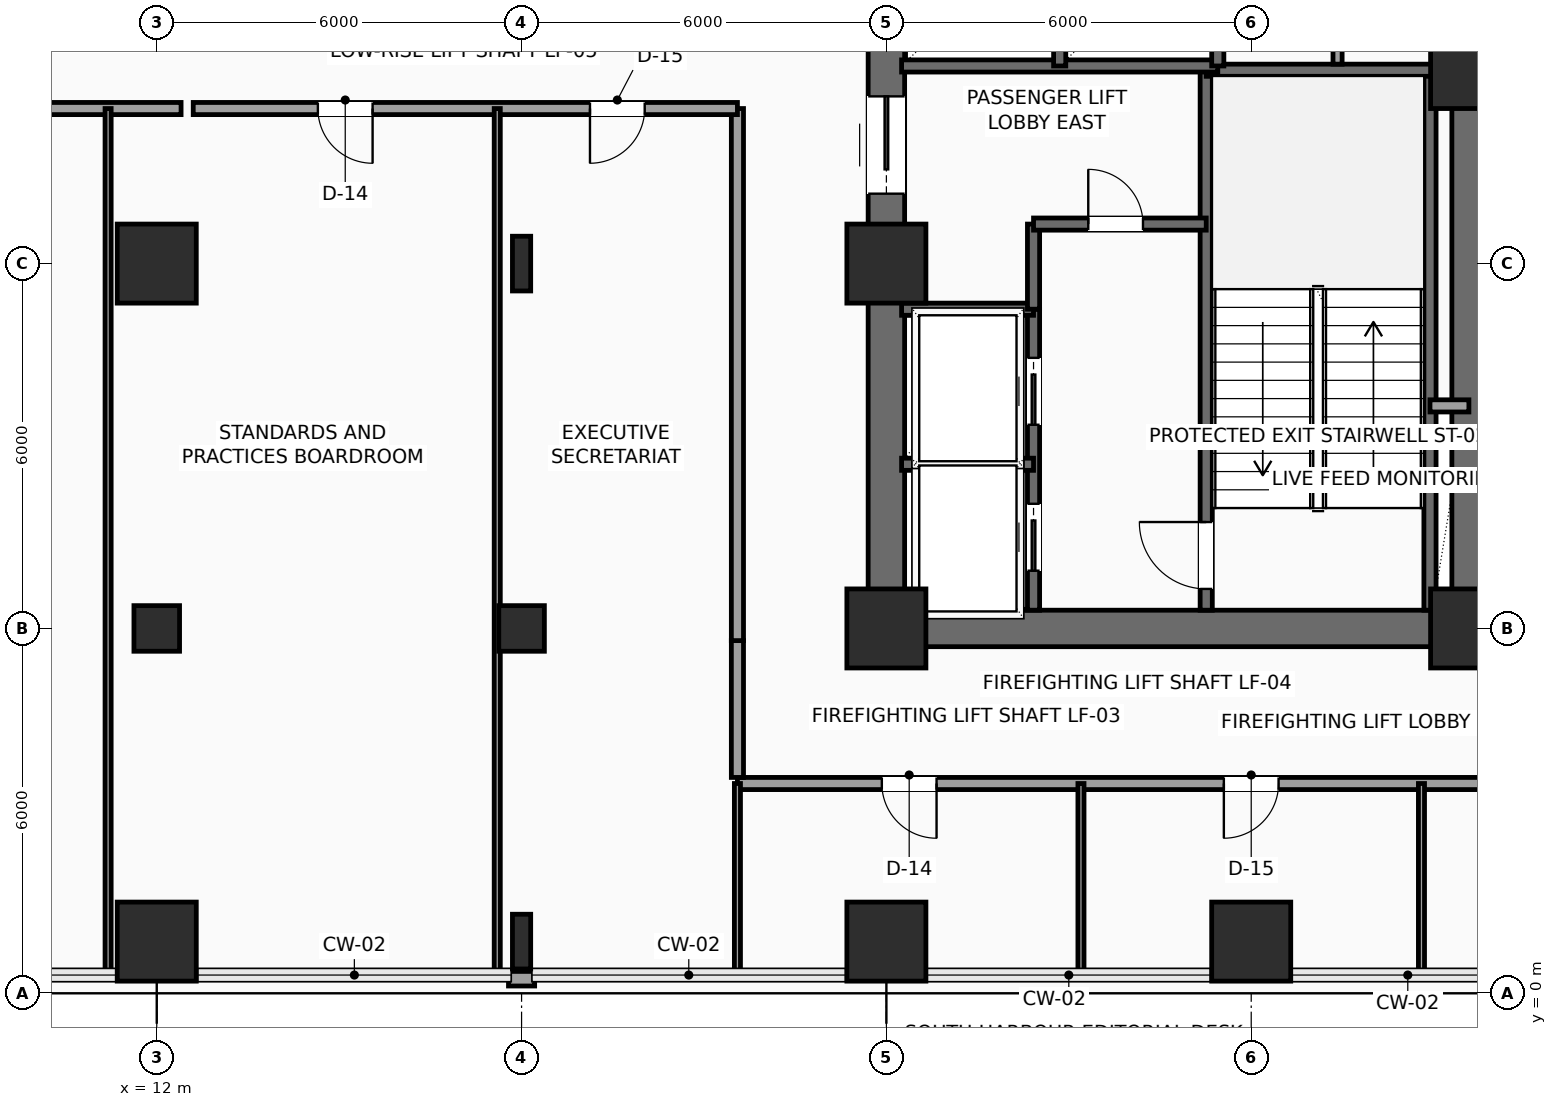
"""IFC4 building model, lengths in metres.
Left out: names, types, materials, properties, quantities, classifications, styles, units other than length and angle.
Written with IfcOpenShell. Run it as: python <this file> out.ifc"""

import sys

from ifc_helpers import new_model, si_unit, direction, frame, frame_2d, origin, origin_2d, place, context, subcontext, project, spatial, rectangle, hollow_rectangle, i_section, extrude, element, fill, save


model = new_model("IFC4")
c1 = context("Model", 3, precision=1e-05, world=origin(), true_north=direction((0.0, 1.0)))
c2 = subcontext(c1, "Body", "Model", "MODEL_VIEW")
j1 = project(units=[si_unit("LENGTHUNIT", "METRE"), si_unit("PLANEANGLEUNIT", "RADIAN")], contexts=[c1])
p1 = place(None, origin())
s1 = spatial("IfcSite", under=j1, at=p1, CompositionType="ELEMENT")
p2 = place(p1, origin())
s2 = spatial("IfcBuilding", under=s1, at=p2, CompositionType="ELEMENT")
p3 = place(p2, frame((0.0, 0.0, 90.9)))
s3 = spatial("IfcBuildingStorey", under=s2, at=p3, CompositionType="ELEMENT", Elevation=90.9)
for number, where, z_axis, x_axis in (
    (1, (24.0, 6.0, 0.0), (0.0, 0.0, 1.0), (1.0, 0.0, 0.0)),
    (2, (24.0, 12.0, 0.0), (0.0, 0.0, 1.0), (1.0, 0.0, 0.0)),
    (3, (33.6, 6.0, 0.0), (0.0, 0.0, 1.0), (1.0, 0.0, 0.0)),
    (4, (33.6, 15.2, 0.0), (0.0, 0.0, 1.0), (1.0, 0.0, 0.0)),
    (5, (12.0, 0.85, 0.0), (0.0, 0.0, 1.0), (1.0, 0.0, 0.0)),
):
    element("IfcColumn", number, at=place(p3, frame(where, z_axis=z_axis, x_axis=x_axis)), inside=s3, PredefinedType="COLUMN", context=c2, shape_type="SweptSolid", body=[
        extrude(rectangle(XDim=1.3, YDim=1.3, at=origin_2d()), origin(), (0.0, 0.0, 1.0), 3.9),
    ])
p4 = place(p3, frame((12.0, 6.0, 0.0), z_axis=(0.0, 0.0, 1.0), x_axis=(1.0, 0.0, 0.0)))
e6 = element("IfcColumn", 6, at=p4, inside=s3, PredefinedType="COLUMN", context=c2, shape_type="SweptSolid", body=[
    extrude(hollow_rectangle(XDim=0.75, YDim=0.75, WallThickness=0.035, InnerFilletRadius=0.035, OuterFilletRadius=0.05, at=origin_2d()), origin(), (0.0, 0.0, 1.0), 3.9),
])
p5 = place(p3, frame((12.0, 12.0, 0.0), z_axis=(0.0, 0.0, 1.0), x_axis=(1.0, 0.0, 0.0)))
e7 = element("IfcColumn", 7, at=p5, inside=s3, PredefinedType="COLUMN", context=c2, shape_type="SweptSolid", body=[
    extrude(rectangle(XDim=1.3, YDim=1.3, at=origin_2d()), origin(), (0.0, 0.0, 1.0), 3.9),
])
p6 = place(p3, frame((18.0, 0.85, 0.0), z_axis=(0.0, 0.0, 1.0), x_axis=(1.0, 0.0, 0.0)))
e8 = element("IfcColumn", 8, at=p6, inside=s3, PredefinedType="COLUMN", context=c2, shape_type="SweptSolid", body=[
    extrude(i_section(OverallWidth=0.3, OverallDepth=0.9, WebThickness=0.019, FlangeThickness=0.035, FilletRadius=0.03, at=origin_2d()), origin(), (0.0, 0.0, 1.0), 3.9),
])
p7 = place(p3, frame((18.0, 6.0, 0.0), z_axis=(0.0, 0.0, 1.0), x_axis=(1.0, 0.0, 0.0)))
e9 = element("IfcColumn", 9, at=p7, inside=s3, PredefinedType="COLUMN", context=c2, shape_type="SweptSolid", body=[
    extrude(hollow_rectangle(XDim=0.75, YDim=0.75, WallThickness=0.035, InnerFilletRadius=0.035, OuterFilletRadius=0.05, at=origin_2d()), origin(), (0.0, 0.0, 1.0), 3.9),
])
p8 = place(p3, frame((18.0, 12.0, 0.0), z_axis=(0.0, 0.0, 1.0), x_axis=(1.0, 0.0, 0.0)))
e10 = element("IfcColumn", 10, at=p8, inside=s3, PredefinedType="COLUMN", context=c2, shape_type="SweptSolid", body=[
    extrude(i_section(OverallWidth=0.3, OverallDepth=0.9, WebThickness=0.019, FlangeThickness=0.035, FilletRadius=0.03, at=origin_2d()), origin(), (0.0, 0.0, 1.0), 3.9),
])
for number, where, z_axis, x_axis in (
    (11, (24.0, 0.85, 0.0), (0.0, 0.0, 1.0), (1.0, 0.0, 0.0)),
    (12, (30.0, 0.85, 0.0), (0.0, 0.0, 1.0), (1.0, 0.0, 0.0)),
):
    element("IfcColumn", number, at=place(p3, frame(where, z_axis=z_axis, x_axis=x_axis)), inside=s3, PredefinedType="COLUMN", context=c2, shape_type="SweptSolid", body=[
        extrude(rectangle(XDim=1.3, YDim=1.3, at=origin_2d()), origin(), (0.0, 0.0, 1.0), 3.9),
    ])
p9 = place(p3, frame((18.215, 0.24, 0.0), z_axis=(0.0, 0.0, 1.0), x_axis=(-1.0, 0.0, 0.0)))
e13 = element("IfcWall", 13, at=p9, inside=s3, PredefinedType="SOLIDWALL", context=c2, shape_type="SweptSolid", body=[
    extrude(rectangle(XDim=0.43, YDim=0.24, at=frame_2d((0.215, 0.0))), origin(), (0.0, 0.0, 1.0), 3.575),
])
p10 = place(p3, frame((24.0, 6.0, 0.0), z_axis=(0.0, 0.0, 1.0), x_axis=(1.0, 0.0, 0.0)))
e14 = element("IfcWall", 14, at=p10, inside=s3, PredefinedType="SHEAR", context=c2, shape_type="SweptSolid", body=[
    extrude(rectangle(XDim=9.6, YDim=0.6, at=frame_2d((4.8, 0.0))), origin(), (0.0, 0.0, 1.0), 3.575),
])
p11 = place(p3, frame((24.0, 6.0, 0.0), z_axis=(0.0, 0.0, 1.0), x_axis=(0.0, 1.0, 0.0)))
e15 = element("IfcWall", 15, at=p11, inside=s3, PredefinedType="SHEAR", context=c2, shape_type="SweptSolid", body=[
    extrude(rectangle(XDim=12.0, YDim=0.6, at=frame_2d((6.0, 0.0))), origin(), (0.0, 0.0, 1.0), 3.575),
])
p12 = place(p11, frame((7.15, 0.0, 0.0)))
e16 = element("IfcOpeningElement", 16, at=p12, cuts=e15, PredefinedType="OPENING", context=c2, shape_type="SweptSolid", body=[
    extrude(rectangle(XDim=1.6, YDim=2.3, at=frame_2d((0.8, 1.15))), frame((0.0, 0.31, 0.0), z_axis=(0.0, -1.0, 0.0), x_axis=(1.0, 0.0, 0.0)), (0.0, 0.0, 1.0), 0.62),
])
p13 = place(p3, frame((33.6, 6.0, 0.0), z_axis=(0.0, 0.0, 1.0), x_axis=(0.0, 1.0, 0.0)))
e17 = element("IfcWall", 17, at=p13, inside=s3, PredefinedType="SHEAR", context=c2, shape_type="SweptSolid", body=[
    extrude(rectangle(XDim=12.0, YDim=0.6, at=frame_2d((6.0, 0.0))), origin(), (0.0, 0.0, 1.0), 3.575),
])
p14 = place(p13, frame((10.2, 0.0, 0.0)))
e18 = element("IfcOpeningElement", 18, at=p14, cuts=e17, PredefinedType="OPENING", context=c2, shape_type="SweptSolid", body=[
    extrude(rectangle(XDim=0.9, YDim=2.15, at=frame_2d((0.45, 1.075))), frame((0.0, 0.31, 0.0), z_axis=(0.0, -1.0, 0.0), x_axis=(1.0, 0.0, 0.0)), (0.0, 0.0, 1.0), 0.62),
])
p15 = place(p3, frame((29.26, 6.3, 0.0), z_axis=(0.0, 0.0, 1.0), x_axis=(0.0, 1.0, 0.0)))
e19 = element("IfcWall", 19, at=p15, inside=s3, PredefinedType="SHEAR", context=c2, shape_type="SweptSolid", body=[
    extrude(rectangle(XDim=8.88, YDim=0.2, at=frame_2d((4.44, 0.0))), origin(), (0.0, 0.0, 1.0), 3.575),
])
p16 = place(p15, frame((0.35, 0.0, 0.0)))
e20 = element("IfcOpeningElement", 20, at=p16, cuts=e19, PredefinedType="OPENING", context=c2, shape_type="SweptSolid", body=[
    extrude(rectangle(XDim=1.1, YDim=2.2, at=frame_2d((0.55, 1.1))), frame((0.0, 0.11, 0.0), z_axis=(0.0, -1.0, 0.0), x_axis=(1.0, 0.0, 0.0)), (0.0, 0.0, 1.0), 0.22),
])
p17 = place(p3, frame((32.94, 6.3, 0.0), z_axis=(0.0, 0.0, 1.0), x_axis=(0.0, 1.0, 0.0)))
e21 = element("IfcWall", 21, at=p17, inside=s3, PredefinedType="SHEAR", context=c2, shape_type="SweptSolid", body=[
    extrude(rectangle(XDim=8.88, YDim=0.2, at=frame_2d((4.44, 0.0))), origin(), (0.0, 0.0, 1.0), 3.575),
])
p18 = place(p3, frame((29.26, 15.18, 0.0), z_axis=(0.0, 0.0, 1.0), x_axis=(1.0, 0.0, 0.0)))
e22 = element("IfcWall", 22, at=p18, inside=s3, PredefinedType="SHEAR", context=c2, shape_type="SweptSolid", body=[
    extrude(rectangle(XDim=4.04, YDim=0.2, at=frame_2d((2.02, 0.0))), origin(), (0.0, 0.0, 1.0), 3.575),
])
p19 = place(p3, frame((26.42, 6.3, 0.0), z_axis=(0.0, 0.0, 1.0), x_axis=(0.0, 1.0, 0.0)))
e23 = element("IfcWall", 23, at=p19, inside=s3, PredefinedType="SHEAR", context=c2, shape_type="SweptSolid", body=[
    extrude(rectangle(XDim=4.95, YDim=0.2, at=frame_2d((2.475, 0.0))), origin(), (0.0, 0.0, 1.0), 3.575),
])
p20 = place(p19, frame((0.65, 0.0, 0.0)))
e24 = element("IfcOpeningElement", 24, at=p20, cuts=e23, PredefinedType="OPENING", context=c2, shape_type="SweptSolid", body=[
    extrude(rectangle(XDim=1.1, YDim=2.2, at=frame_2d((0.55, 1.1))), frame((0.0, 0.11, 0.0), z_axis=(0.0, -1.0, 0.0), x_axis=(1.0, 0.0, 0.0)), (0.0, 0.0, 1.0), 0.22),
])
p21 = place(p19, frame((3.05, 0.0, 0.0)))
e25 = element("IfcOpeningElement", 25, at=p21, cuts=e23, PredefinedType="OPENING", context=c2, shape_type="SweptSolid", body=[
    extrude(rectangle(XDim=1.1, YDim=2.2, at=frame_2d((0.55, 1.1))), frame((0.0, 0.11, 0.0), z_axis=(0.0, -1.0, 0.0), x_axis=(1.0, 0.0, 0.0)), (0.0, 0.0, 1.0), 0.22),
])
for number, where, z_axis, x_axis in (
    (26, (24.25, 8.7, 0.0), (0.0, 0.0, 1.0), (1.0, 0.0, 0.0)),
    (27, (24.25, 11.25, 0.0), (0.0, 0.0, 1.0), (1.0, 0.0, 0.0)),
):
    element("IfcWall", number, at=place(p3, frame(where, z_axis=z_axis, x_axis=x_axis)), inside=s3, PredefinedType="SHEAR", context=c2, shape_type="SweptSolid", body=[
        extrude(rectangle(XDim=2.17, YDim=0.2, at=frame_2d((1.085, 0.0))), origin(), (0.0, 0.0, 1.0), 3.575),
    ])
p22 = place(p3, frame((26.42, 11.25, 0.0), z_axis=(0.0, 0.0, 1.0), x_axis=(0.0, 1.0, 0.0)))
e28 = element("IfcWall", 28, at=p22, inside=s3, PredefinedType="SHEAR", context=c2, shape_type="SweptSolid", body=[
    extrude(rectangle(XDim=1.4, YDim=0.2, at=frame_2d((0.7, 0.0))), origin(), (0.0, 0.0, 1.0), 3.575),
])
p23 = place(p3, frame((26.42, 12.65, 0.0), z_axis=(0.0, 0.0, 1.0), x_axis=(1.0, 0.0, 0.0)))
e29 = element("IfcWall", 29, at=p23, inside=s3, PredefinedType="SHEAR", context=c2, shape_type="SweptSolid", body=[
    extrude(rectangle(XDim=2.84, YDim=0.2, at=frame_2d((1.42, 0.0))), origin(), (0.0, 0.0, 1.0), 3.575),
])
p24 = place(p23, frame((0.9, 0.0, 0.0)))
e30 = element("IfcOpeningElement", 30, at=p24, cuts=e29, PredefinedType="OPENING", context=c2, shape_type="SweptSolid", body=[
    extrude(rectangle(XDim=0.9, YDim=2.15, at=frame_2d((0.45, 1.075))), frame((0.0, 0.11, 0.0), z_axis=(0.0, -1.0, 0.0), x_axis=(1.0, 0.0, 0.0)), (0.0, 0.0, 1.0), 0.22),
])
p25 = place(p3, frame((32.94, 9.66, 0.0), z_axis=(0.0, 0.0, 1.0), x_axis=(1.0, 0.0, 0.0)))
e31 = element("IfcWall", 31, at=p25, inside=s3, PredefinedType="SOLIDWALL", context=c2, shape_type="SweptSolid", body=[
    extrude(rectangle(XDim=0.64, YDim=0.2, at=frame_2d((0.32, 0.0))), origin(), (0.0, 0.0, 1.0), 3.575),
])
p26 = place(p3, frame((24.25, 15.25, 0.0), z_axis=(0.0, 0.0, 1.0), x_axis=(1.0, 0.0, 0.0)))
e32 = element("IfcWall", 32, at=p26, inside=s3, PredefinedType="SHEAR", context=c2, shape_type="SweptSolid", body=[
    extrude(rectangle(XDim=5.2, YDim=0.2, at=frame_2d((2.6, 0.0))), origin(), (0.0, 0.0, 1.0), 3.575),
])
p27 = place(p3, frame((26.85, 15.25, 0.0), z_axis=(0.0, 0.0, 1.0), x_axis=(0.0, 1.0, 0.0)))
e33 = element("IfcWall", 33, at=p27, inside=s3, PredefinedType="SHEAR", context=c2, shape_type="SweptSolid", body=[
    extrude(rectangle(XDim=2.4, YDim=0.2, at=frame_2d((1.2, 0.0))), origin(), (0.0, 0.0, 1.0), 3.575),
])
p28 = place(p3, frame((29.45, 15.25, 0.0), z_axis=(0.0, 0.0, 1.0), x_axis=(0.0, 1.0, 0.0)))
e34 = element("IfcWall", 34, at=p28, inside=s3, PredefinedType="SHEAR", context=c2, shape_type="SweptSolid", body=[
    extrude(rectangle(XDim=2.45, YDim=0.2, at=frame_2d((1.225, 0.0))), origin(), (0.0, 0.0, 1.0), 3.575),
])
p29 = place(p3, frame((31.42, 15.28, 0.0), z_axis=(0.0, 0.0, 1.0), x_axis=(0.0, 1.0, 0.0)))
e35 = element("IfcWall", 35, at=p29, inside=s3, PredefinedType="PARTITIONING", context=c2, shape_type="SweptSolid", body=[
    extrude(rectangle(XDim=2.42, YDim=0.15, at=frame_2d((1.21, 0.0))), origin(), (0.0, 0.0, 1.0), 3.575),
])
p30 = place(p29, frame((0.65, 0.0, 0.0)))
e36 = element("IfcOpeningElement", 36, at=p30, cuts=e35, PredefinedType="OPENING", context=c2, shape_type="SweptSolid", body=[
    extrude(rectangle(XDim=0.9, YDim=2.15, at=frame_2d((0.45, 1.075))), frame((0.0, 0.085, 0.0), z_axis=(0.0, -1.0, 0.0), x_axis=(1.0, 0.0, 0.0)), (0.0, 0.0, 1.0), 0.17),
])
p31 = place(p3, frame((36.15, 3.45, 0.0), z_axis=(0.0, 0.0, 1.0), x_axis=(-1.0, 0.0, 0.0)))
e37 = element("IfcWall", 37, at=p31, inside=s3, PredefinedType="SOLIDWALL", context=c2, shape_type="SweptSolid", body=[
    extrude(rectangle(XDim=14.6, YDim=0.2, at=frame_2d((7.3, 0.0))), origin(), (0.0, 0.0, 1.0), 3.067),
])
p32 = place(p31, frame((11.325, 0.0, 0.0)))
e38 = element("IfcOpeningElement", 38, at=p32, cuts=e37, PredefinedType="OPENING", context=c2, shape_type="SweptSolid", body=[
    extrude(rectangle(XDim=0.9, YDim=2.1, at=frame_2d((0.45, 1.05))), frame((0.0, 0.11, 0.0), z_axis=(0.0, -1.0, 0.0), x_axis=(1.0, 0.0, 0.0)), (0.0, 0.0, 1.0), 0.22),
])
p33 = place(p31, frame((5.7, 0.0, 0.0)))
e39 = element("IfcOpeningElement", 39, at=p33, cuts=e37, PredefinedType="OPENING", context=c2, shape_type="SweptSolid", body=[
    extrude(rectangle(XDim=0.9, YDim=2.1, at=frame_2d((0.45, 1.05))), frame((0.0, 0.11, 0.0), z_axis=(0.0, -1.0, 0.0), x_axis=(1.0, 0.0, 0.0)), (0.0, 0.0, 1.0), 0.22),
])
p34 = place(p3, frame((21.55, 3.55, 0.0), z_axis=(0.0, 0.0, 1.0), x_axis=(0.0, 1.0, 0.0)))
e40 = element("IfcWall", 40, at=p34, inside=s3, PredefinedType="SOLIDWALL", context=c2, shape_type="SweptSolid", body=[
    extrude(rectangle(XDim=2.25, YDim=0.2, at=frame_2d((1.125, 0.0))), origin(), (0.0, 0.0, 1.0), 3.575),
])
p35 = place(p3, frame((21.55, 5.8, 0.0), z_axis=(0.0, 0.0, 1.0), x_axis=(0.0, 1.0, 0.0)))
e41 = element("IfcWall", 41, at=p35, inside=s3, PredefinedType="SOLIDWALL", context=c2, shape_type="SweptSolid", body=[
    extrude(rectangle(XDim=8.75, YDim=0.2, at=frame_2d((4.375, 0.0))), origin(), (0.0, 0.0, 1.0), 3.575),
])
p36 = place(p3, frame((21.55, 14.55, 0.0), z_axis=(0.0, 0.0, 1.0), x_axis=(-1.0, 0.0, 0.0)))
e42 = element("IfcWall", 42, at=p36, inside=s3, PredefinedType="SOLIDWALL", context=c2, shape_type="SweptSolid", body=[
    extrude(rectangle(XDim=8.95, YDim=0.2, at=frame_2d((4.475, 0.0))), origin(), (0.0, 0.0, 1.0), 3.575),
])
p37 = place(p36, frame((6.0, 0.0, 0.0)))
e43 = element("IfcOpeningElement", 43, at=p37, cuts=e42, PredefinedType="OPENING", context=c2, shape_type="SweptSolid", body=[
    extrude(rectangle(XDim=0.9, YDim=2.1, at=frame_2d((0.45, 1.05))), frame((0.0, 0.11, 0.0), z_axis=(0.0, -1.0, 0.0), x_axis=(1.0, 0.0, 0.0)), (0.0, 0.0, 1.0), 0.22),
])
p38 = place(p36, frame((1.525, 0.0, 0.0)))
e44 = element("IfcOpeningElement", 44, at=p38, cuts=e42, PredefinedType="OPENING", context=c2, shape_type="SweptSolid", body=[
    extrude(rectangle(XDim=0.9, YDim=2.1, at=frame_2d((0.45, 1.05))), frame((0.0, 0.11, 0.0), z_axis=(0.0, -1.0, 0.0), x_axis=(1.0, 0.0, 0.0)), (0.0, 0.0, 1.0), 0.22),
])
p39 = place(p3, frame((12.4, 14.55, 0.0), z_axis=(0.0, 0.0, 1.0), x_axis=(-1.0, 0.0, 0.0)))
e45 = element("IfcWall", 45, at=p39, inside=s3, PredefinedType="SOLIDWALL", context=c2, shape_type="SweptSolid", body=[
    extrude(rectangle(XDim=7.15, YDim=0.2, at=frame_2d((3.575, 0.0))), origin(), (0.0, 0.0, 1.0), 3.575),
])
p40 = place(p39, frame((3.725, 0.0, 0.0)))
e46 = element("IfcOpeningElement", 46, at=p40, cuts=e45, PredefinedType="OPENING", context=c2, shape_type="SweptSolid", body=[
    extrude(rectangle(XDim=0.9, YDim=2.1, at=frame_2d((0.45, 1.05))), frame((0.0, 0.11, 0.0), z_axis=(0.0, -1.0, 0.0), x_axis=(1.0, 0.0, 0.0)), (0.0, 0.0, 1.0), 0.22),
])
p41 = place(p3, frame((6.215, 0.323, 0.0), z_axis=(0.0, 0.0, 1.0), x_axis=(0.999989402769, -0.00460373219, 0.0)))
e47 = element("IfcWall", 47, at=p41, inside=s3, PredefinedType="PARTITIONING", context=c2, shape_type="SweptSolid", body=[
    extrude(rectangle(XDim=4.985, YDim=0.1, at=frame_2d((2.492, 0.0))), origin(), (0.0, 0.0, 1.0), 3.575),
])
for number, where, z_axis, x_axis in (
    (48, (11.2, 0.3, 0.0), (0.0, 0.0, 1.0), (0.0, 1.0, 0.0)),
    (49, (17.6, 0.3, 0.0), (0.0, 0.0, 1.0), (0.0, 1.0, 0.0)),
):
    element("IfcWall", number, at=place(p3, frame(where, z_axis=z_axis, x_axis=x_axis)), inside=s3, PredefinedType="PARTITIONING", context=c2, shape_type="SweptSolid", body=[
        extrude(rectangle(XDim=14.25, YDim=0.1, at=frame_2d((7.125, 0.0))), origin(), (0.0, 0.0, 1.0), 3.575),
    ])
for number, where, z_axis, x_axis in (
    (50, (21.55, 0.3, 0.0), (0.0, 0.0, 1.0), (0.0, 1.0, 0.0)),
    (51, (27.2, 0.3, 0.0), (0.0, 0.0, 1.0), (0.0, 1.0, 0.0)),
    (52, (32.8, 0.3, 0.0), (0.0, 0.0, 1.0), (0.0, 1.0, 0.0)),
):
    element("IfcWall", number, at=place(p3, frame(where, z_axis=z_axis, x_axis=x_axis)), inside=s3, PredefinedType="PARTITIONING", context=c2, shape_type="SweptSolid", body=[
        extrude(rectangle(XDim=3.15, YDim=0.1, at=frame_2d((1.575, 0.0))), origin(), (0.0, 0.0, 1.0), 3.575),
    ])
p42 = place(p3, frame((33.65, 5.8, 0.0), z_axis=(0.0, 0.0, 1.0), x_axis=(1.0, 0.0, 0.0)))
e53 = element("IfcWall", 53, at=p42, inside=s3, PredefinedType="PARTITIONING", context=c2, shape_type="SweptSolid", body=[
    extrude(rectangle(XDim=2.5, YDim=0.1, at=frame_2d((1.25, 0.0))), origin(), (0.0, 0.0, 1.0), 2.917),
])
p43 = place(p12, origin())
e54 = element("IfcDoor", 54, at=p43, inside=s3, OperationType="DOUBLE_DOOR_SLIDING", PredefinedType="DOOR", context=c2, shape_type="SweptSolid", body=[
    extrude(rectangle(XDim=1.6, YDim=2.3, at=frame_2d((0.8, 1.15))), frame((0.0, 0.025, 0.0), z_axis=(0.0, -1.0, 0.0), x_axis=(1.0, 0.0, 0.0)), (0.0, 0.0, 1.0), 0.05),
])
fill(e16, e54)
p44 = place(p16, origin())
e55 = element("IfcDoor", 55, at=p44, inside=s3, OperationType="SINGLE_SWING_RIGHT", PredefinedType="DOOR", context=c2, shape_type="SweptSolid", body=[
    extrude(rectangle(XDim=1.1, YDim=2.2, at=frame_2d((0.55, 1.1))), frame((0.0, 0.025, 0.0), z_axis=(0.0, -1.0, 0.0), x_axis=(1.0, 0.0, 0.0)), (0.0, 0.0, 1.0), 0.05),
])
fill(e20, e55)
p45 = place(p20, origin())
e56 = element("IfcDoor", 56, at=p45, inside=s3, OperationType="SLIDING_TO_LEFT", PredefinedType="DOOR", context=c2, shape_type="SweptSolid", body=[
    extrude(rectangle(XDim=1.1, YDim=2.2, at=frame_2d((0.55, 1.1))), frame((0.0, 0.025, 0.0), z_axis=(0.0, -1.0, 0.0), x_axis=(1.0, 0.0, 0.0)), (0.0, 0.0, 1.0), 0.05),
])
fill(e24, e56)
p46 = place(p21, origin())
e57 = element("IfcDoor", 57, at=p46, inside=s3, OperationType="SLIDING_TO_LEFT", PredefinedType="DOOR", context=c2, shape_type="SweptSolid", body=[
    extrude(rectangle(XDim=1.1, YDim=2.2, at=frame_2d((0.55, 1.1))), frame((0.0, 0.025, 0.0), z_axis=(0.0, -1.0, 0.0), x_axis=(1.0, 0.0, 0.0)), (0.0, 0.0, 1.0), 0.05),
])
fill(e25, e57)
p47 = place(p24, origin())
e58 = element("IfcDoor", 58, at=p47, inside=s3, OperationType="SINGLE_SWING_LEFT", PredefinedType="DOOR", context=c2, shape_type="SweptSolid", body=[
    extrude(rectangle(XDim=0.9, YDim=2.15, at=frame_2d((0.45, 1.075))), frame((0.0, 0.025, 0.0), z_axis=(0.0, -1.0, 0.0), x_axis=(1.0, 0.0, 0.0)), (0.0, 0.0, 1.0), 0.05),
])
fill(e30, e58)
p48 = place(p32, origin())
e59 = element("IfcDoor", 59, at=p48, inside=s3, OperationType="SINGLE_SWING_LEFT", PredefinedType="DOOR", context=c2, shape_type="SweptSolid", body=[
    extrude(rectangle(XDim=0.9, YDim=2.1, at=frame_2d((0.45, 1.05))), frame((0.0, 0.025, 0.0), z_axis=(0.0, -1.0, 0.0), x_axis=(1.0, 0.0, 0.0)), (0.0, 0.0, 1.0), 0.05),
])
fill(e38, e59)
p49 = place(p33, origin())
e60 = element("IfcDoor", 60, at=p49, inside=s3, OperationType="SINGLE_SWING_RIGHT", PredefinedType="DOOR", context=c2, shape_type="SweptSolid", body=[
    extrude(rectangle(XDim=0.9, YDim=2.1, at=frame_2d((0.45, 1.05))), frame((0.0, 0.025, 0.0), z_axis=(0.0, -1.0, 0.0), x_axis=(1.0, 0.0, 0.0)), (0.0, 0.0, 1.0), 0.05),
])
fill(e39, e60)
p50 = place(p37, origin())
e61 = element("IfcDoor", 61, at=p50, inside=s3, OperationType="SINGLE_SWING_LEFT", PredefinedType="DOOR", context=c2, shape_type="SweptSolid", body=[
    extrude(rectangle(XDim=0.9, YDim=2.1, at=frame_2d((0.45, 1.05))), frame((0.0, 0.025, 0.0), z_axis=(0.0, -1.0, 0.0), x_axis=(1.0, 0.0, 0.0)), (0.0, 0.0, 1.0), 0.05),
])
fill(e43, e61)
p51 = place(p38, origin())
e62 = element("IfcDoor", 62, at=p51, inside=s3, OperationType="SINGLE_SWING_RIGHT", PredefinedType="DOOR", context=c2, shape_type="SweptSolid", body=[
    extrude(rectangle(XDim=0.9, YDim=2.1, at=frame_2d((0.45, 1.05))), frame((0.0, 0.025, 0.0), z_axis=(0.0, -1.0, 0.0), x_axis=(1.0, 0.0, 0.0)), (0.0, 0.0, 1.0), 0.05),
])
fill(e44, e62)
save(model, sys.argv[1])
